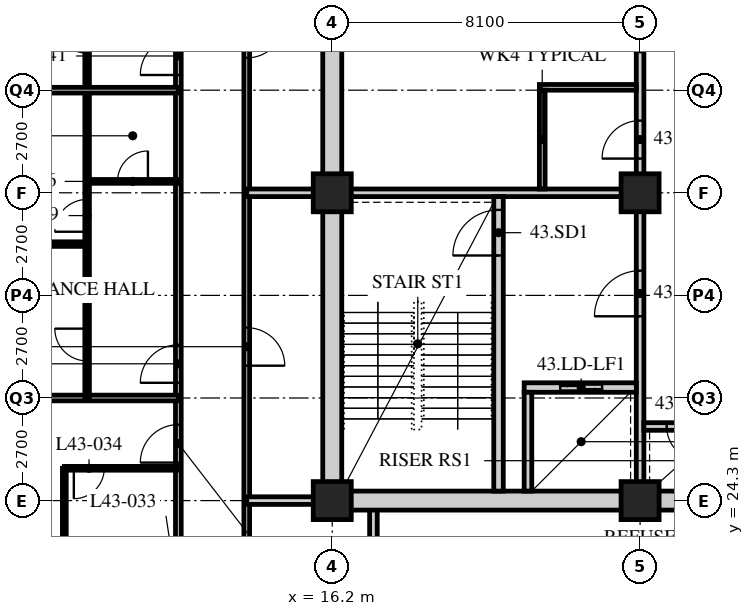
"""IFC4 building model, lengths in metres.
Left out: names, types, materials, properties, quantities, classifications, styles, units other than length and angle.
Written with IfcOpenShell. Run it as: python <this file> out.ifc"""

import sys

from ifc_helpers import new_model, si_unit, direction, frame, frame_2d, origin, origin_2d, place, context, subcontext, project, spatial, rectangle, hollow_rectangle, extrude, element, fill, save


model = new_model("IFC4")
c1 = context("Model", 3, precision=1e-05, world=origin(), true_north=direction((0.0, 1.0)))
c2 = subcontext(c1, "Body", "Model", "MODEL_VIEW")
j1 = project(units=[si_unit("LENGTHUNIT", "METRE"), si_unit("PLANEANGLEUNIT", "RADIAN")], contexts=[c1])
p1 = place(None, origin())
s1 = spatial("IfcSite", under=j1, at=p1, CompositionType="ELEMENT")
p2 = place(p1, origin())
s2 = spatial("IfcBuilding", under=s1, at=p2, CompositionType="ELEMENT")
p3 = place(p2, frame((0.0, 0.0, 170.4)))
s3 = spatial("IfcBuildingStorey", under=s2, at=p3, CompositionType="ELEMENT", Elevation=170.4)
for number, where, z_axis, x_axis in (
    (1, (16.2, 24.3, 0.0), (0.0, 0.0, 1.0), (1.0, 0.0, 0.0)),
    (2, (16.2, 32.4, 0.0), (0.0, 0.0, 1.0), (1.0, 0.0, 0.0)),
    (3, (24.3, 24.3, 0.0), (0.0, 0.0, 1.0), (1.0, 0.0, 0.0)),
    (4, (24.3, 32.4, 0.0), (0.0, 0.0, 1.0), (1.0, 0.0, 0.0)),
):
    element("IfcColumn", number, at=place(p3, frame(where, z_axis=z_axis, x_axis=x_axis)), inside=s3, PredefinedType="COLUMN", context=c2, shape_type="SweptSolid", body=[
        extrude(hollow_rectangle(XDim=1.0, YDim=1.0, WallThickness=0.1, at=origin_2d()), origin(), (0.0, 0.0, 1.0), 3.6),
    ])
p4 = place(p3, frame((12.15, 18.9, 0.0), z_axis=(0.0, 0.0, 1.0), x_axis=(0.0, 1.0, 0.0)))
e5 = element("IfcWall", 5, at=p4, inside=s3, PredefinedType="PARTITIONING", context=c2, shape_type="SweptSolid", body=[
    extrude(rectangle(XDim=24.3, YDim=0.15, at=frame_2d((12.15, 0.0))), origin(), (0.0, 0.0, 1.0), 3.39),
])
p5 = place(p4, frame((2.35, 0.0, 0.0)))
e6 = element("IfcOpeningElement", 6, at=p5, cuts=e5, PredefinedType="OPENING", context=c2, shape_type="SweptSolid", body=[
    extrude(rectangle(XDim=1.0, YDim=2.1, at=frame_2d((0.5, 1.05))), frame((0.0, 0.085, 0.0), z_axis=(0.0, -1.0, 0.0), x_axis=(1.0, 0.0, 0.0)), (0.0, 0.0, 1.0), 0.17),
])
p6 = place(p4, frame((6.4, 0.0, 0.0)))
e7 = element("IfcOpeningElement", 7, at=p6, cuts=e5, PredefinedType="OPENING", context=c2, shape_type="SweptSolid", body=[
    extrude(rectangle(XDim=1.0, YDim=2.1, at=frame_2d((0.5, 1.05))), frame((0.0, 0.085, 0.0), z_axis=(0.0, -1.0, 0.0), x_axis=(1.0, 0.0, 0.0)), (0.0, 0.0, 1.0), 0.17),
])
p7 = place(p4, frame((8.5, 0.0, 0.0)))
e8 = element("IfcOpeningElement", 8, at=p7, cuts=e5, PredefinedType="OPENING", context=c2, shape_type="SweptSolid", body=[
    extrude(rectangle(XDim=1.0, YDim=2.1, at=frame_2d((0.5, 1.05))), frame((0.0, 0.085, 0.0), z_axis=(0.0, -1.0, 0.0), x_axis=(1.0, 0.0, 0.0)), (0.0, 0.0, 1.0), 0.17),
])
p8 = place(p4, frame((16.6, 0.0, 0.0)))
e9 = element("IfcOpeningElement", 9, at=p8, cuts=e5, PredefinedType="OPENING", context=c2, shape_type="SweptSolid", body=[
    extrude(rectangle(XDim=1.0, YDim=2.1, at=frame_2d((0.5, 1.05))), frame((0.0, 0.085, 0.0), z_axis=(0.0, -1.0, 0.0), x_axis=(1.0, 0.0, 0.0)), (0.0, 0.0, 1.0), 0.17),
])
p9 = place(p3, frame((13.95, 40.5, 0.0), z_axis=(0.0, 0.0, 1.0), x_axis=(0.0, -1.0, 0.0)))
e10 = element("IfcWall", 10, at=p9, inside=s3, PredefinedType="PARTITIONING", context=c2, shape_type="SweptSolid", body=[
    extrude(rectangle(XDim=19.8, YDim=0.15, at=frame_2d((9.9, 0.0))), origin(), (0.0, 0.0, 1.0), 3.39),
])
p10 = place(p9, frame((11.65, 0.0, 0.0)))
e11 = element("IfcOpeningElement", 11, at=p10, cuts=e10, PredefinedType="OPENING", context=c2, shape_type="SweptSolid", body=[
    extrude(rectangle(XDim=1.0, YDim=2.1, at=frame_2d((0.5, 1.05))), frame((0.0, 0.085, 0.0), z_axis=(0.0, -1.0, 0.0), x_axis=(1.0, 0.0, 0.0)), (0.0, 0.0, 1.0), 0.17),
])
p11 = place(p9, frame((3.55, 0.0, 0.0)))
e12 = element("IfcOpeningElement", 12, at=p11, cuts=e10, PredefinedType="OPENING", context=c2, shape_type="SweptSolid", body=[
    extrude(rectangle(XDim=1.0, YDim=2.1, at=frame_2d((0.5, 1.05))), frame((0.0, 0.085, 0.0), z_axis=(0.0, -1.0, 0.0), x_axis=(1.0, 0.0, 0.0)), (0.0, 0.0, 1.0), 0.17),
])
p12 = place(p3, frame((13.95, 32.4, 0.0), z_axis=(0.0, 0.0, 1.0), x_axis=(1.0, 0.0, 0.0)))
e13 = element("IfcWall", 13, at=p12, inside=s3, PredefinedType="SOLIDWALL", context=c2, shape_type="SweptSolid", body=[
    extrude(rectangle(XDim=2.25, YDim=0.2, at=frame_2d((1.125, 0.0))), origin(), (0.0, 0.0, 1.0), 3.39),
])
p13 = place(p3, frame((17.283, 20.7, 0.0), z_axis=(0.0, 0.0, 1.0), x_axis=(0.0, 1.0, 0.0)))
e14 = element("IfcWall", 14, at=p13, inside=s3, PredefinedType="SOLIDWALL", context=c2, shape_type="SweptSolid", body=[
    extrude(rectangle(XDim=3.6, YDim=0.2, at=frame_2d((1.8, 0.0))), origin(), (0.0, 0.0, 1.0), 3.39),
])
p14 = place(p3, frame((13.95, 24.3, 0.0), z_axis=(0.0, 0.0, 1.0), x_axis=(1.0, 0.0, 0.0)))
e15 = element("IfcWall", 15, at=p14, inside=s3, PredefinedType="SOLIDWALL", context=c2, shape_type="SweptSolid", body=[
    extrude(rectangle(XDim=2.25, YDim=0.2, at=frame_2d((1.125, 0.0))), origin(), (0.0, 0.0, 1.0), 3.39),
])
p15 = place(p3, frame((9.15, 22.95, 0.0), z_axis=(0.0, 0.0, 1.0), x_axis=(0.0, 1.0, 0.0)))
e16 = element("IfcWall", 16, at=p15, inside=s3, PredefinedType="PARTITIONING", context=c2, shape_type="SweptSolid", body=[
    extrude(rectangle(XDim=2.2, YDim=0.1, at=frame_2d((1.1, 0.0))), origin(), (0.0, 0.0, 1.0), 3.39),
])
p16 = place(p3, frame((12.15, 25.15, 0.0), z_axis=(0.0, 0.0, 1.0), x_axis=(-1.0, 0.0, 0.0)))
e17 = element("IfcWall", 17, at=p16, inside=s3, PredefinedType="PARTITIONING", context=c2, shape_type="SweptSolid", body=[
    extrude(rectangle(XDim=3.0, YDim=0.1, at=frame_2d((1.5, 0.0))), origin(), (0.0, 0.0, 1.0), 3.39),
])
p17 = place(p16, frame((1.95, 0.0, 0.0)))
e18 = element("IfcOpeningElement", 18, at=p17, cuts=e17, PredefinedType="OPENING", context=c2, shape_type="SweptSolid", body=[
    extrude(rectangle(XDim=0.8, YDim=2.1, at=frame_2d((0.4, 1.05))), frame((0.0, 0.06, 0.0), z_axis=(0.0, -1.0, 0.0), x_axis=(1.0, 0.0, 0.0)), (0.0, 0.0, 1.0), 0.12),
])
p18 = place(p3, frame((12.15, 27.0, 0.0), z_axis=(0.0, 0.0, 1.0), x_axis=(-1.0, 0.0, 0.0)))
e19 = element("IfcWall", 19, at=p18, inside=s3, PredefinedType="PARTITIONING", context=c2, shape_type="SweptSolid", body=[
    extrude(rectangle(XDim=11.85, YDim=0.15, at=frame_2d((5.925, 0.0))), origin(), (0.0, 0.0, 1.0), 2.778),
])
p19 = place(p3, frame((9.75, 27.0, 0.0), z_axis=(0.0, 0.0, 1.0), x_axis=(0.0, 1.0, 0.0)))
e20 = element("IfcWall", 20, at=p19, inside=s3, PredefinedType="PARTITIONING", context=c2, shape_type="SweptSolid", body=[
    extrude(rectangle(XDim=16.2, YDim=0.12, at=frame_2d((8.1, 0.0))), origin(), (0.0, 0.0, 1.0), 3.39),
])
p20 = place(p19, frame((0.975, 0.0, 0.0)))
e21 = element("IfcOpeningElement", 21, at=p20, cuts=e20, PredefinedType="OPENING", context=c2, shape_type="SweptSolid", body=[
    extrude(rectangle(XDim=0.85, YDim=2.1, at=frame_2d((0.425, 1.05))), frame((0.0, 0.07, 0.0), z_axis=(0.0, -1.0, 0.0), x_axis=(1.0, 0.0, 0.0)), (0.0, 0.0, 1.0), 0.14),
])
p21 = place(p19, frame((4.375, 0.0, 0.0)))
e22 = element("IfcOpeningElement", 22, at=p21, cuts=e20, PredefinedType="OPENING", context=c2, shape_type="SweptSolid", body=[
    extrude(rectangle(XDim=0.85, YDim=2.1, at=frame_2d((0.425, 1.05))), frame((0.0, 0.07, 0.0), z_axis=(0.0, -1.0, 0.0), x_axis=(1.0, 0.0, 0.0)), (0.0, 0.0, 1.0), 0.14),
])
p22 = place(p19, frame((9.075, 0.0, 0.0)))
e23 = element("IfcOpeningElement", 23, at=p22, cuts=e20, PredefinedType="OPENING", context=c2, shape_type="SweptSolid", body=[
    extrude(rectangle(XDim=0.85, YDim=2.1, at=frame_2d((0.425, 1.05))), frame((0.0, 0.07, 0.0), z_axis=(0.0, -1.0, 0.0), x_axis=(1.0, 0.0, 0.0)), (0.0, 0.0, 1.0), 0.14),
])
p23 = place(p19, frame((12.475, 0.0, 0.0)))
e24 = element("IfcOpeningElement", 24, at=p23, cuts=e20, PredefinedType="OPENING", context=c2, shape_type="SweptSolid", body=[
    extrude(rectangle(XDim=0.85, YDim=2.1, at=frame_2d((0.425, 1.05))), frame((0.0, 0.07, 0.0), z_axis=(0.0, -1.0, 0.0), x_axis=(1.0, 0.0, 0.0)), (0.0, 0.0, 1.0), 0.14),
])
p24 = place(p3, frame((12.15, 32.7, 0.0), z_axis=(0.0, 0.0, 1.0), x_axis=(-1.0, 0.0, 0.0)))
e25 = element("IfcWall", 25, at=p24, inside=s3, PredefinedType="PARTITIONING", context=c2, shape_type="SweptSolid", body=[
    extrude(rectangle(XDim=2.4, YDim=0.1, at=frame_2d((1.2, 0.0))), origin(), (0.0, 0.0, 1.0), 3.39),
])
p25 = place(p24, frame((0.8, 0.0, 0.0)))
e26 = element("IfcOpeningElement", 26, at=p25, cuts=e25, PredefinedType="OPENING", context=c2, shape_type="SweptSolid", body=[
    extrude(rectangle(XDim=0.8, YDim=2.1, at=frame_2d((0.4, 1.05))), frame((0.0, 0.06, 0.0), z_axis=(0.0, -1.0, 0.0), x_axis=(1.0, 0.0, 0.0)), (0.0, 0.0, 1.0), 0.12),
])
p26 = place(p3, frame((9.75, 31.05, 0.0), z_axis=(0.0, 0.0, 1.0), x_axis=(-1.0, 0.0, 0.0)))
e27 = element("IfcWall", 27, at=p26, inside=s3, PredefinedType="PARTITIONING", context=c2, shape_type="SweptSolid", body=[
    extrude(rectangle(XDim=9.45, YDim=0.12, at=frame_2d((4.725, 0.0))), origin(), (0.0, 0.0, 1.0), 3.39),
])
p27 = place(p3, frame((12.15, 35.1, 0.0), z_axis=(0.0, 0.0, 1.0), x_axis=(-1.0, 0.0, 0.0)))
e28 = element("IfcWall", 28, at=p27, inside=s3, PredefinedType="PARTITIONING", context=c2, shape_type="SweptSolid", body=[
    extrude(rectangle(XDim=11.85, YDim=0.15, at=frame_2d((5.925, 0.0))), origin(), (0.0, 0.0, 1.0), 2.778),
])
p28 = place(p3, frame((15.95, 24.3, 0.0), z_axis=(0.0, 0.0, 1.0), x_axis=(1.0, 0.0, 0.0)))
e29 = element("IfcWall", 29, at=p28, inside=s3, PredefinedType="SOLIDWALL", context=c2, shape_type="SweptSolid", body=[
    extrude(rectangle(XDim=24.8, YDim=0.5, at=frame_2d((12.4, 0.0))), origin(), (0.0, 0.0, 1.0), 2.74),
])
p29 = place(p28, frame((11.5, 0.0, 0.0)))
e30 = element("IfcOpeningElement", 30, at=p29, cuts=e29, PredefinedType="OPENING", context=c2, shape_type="SweptSolid", body=[
    extrude(rectangle(XDim=1.8, YDim=2.4, at=frame_2d((0.9, 1.2))), frame((0.0, 0.26, 0.0), z_axis=(0.0, -1.0, 0.0), x_axis=(1.0, 0.0, 0.0)), (0.0, 0.0, 1.0), 0.52),
])
p30 = place(p3, frame((16.2, 24.55, 0.0), z_axis=(0.0, 0.0, 1.0), x_axis=(0.0, 1.0, 0.0)))
e31 = element("IfcWall", 31, at=p30, inside=s3, PredefinedType="SOLIDWALL", context=c2, shape_type="SweptSolid", body=[
    extrude(rectangle(XDim=15.7, YDim=0.5, at=frame_2d((7.85, 0.0))), origin(), (0.0, 0.0, 1.0), 2.778),
])
p31 = place(p3, frame((16.45, 32.4, 0.0), z_axis=(0.0, 0.0, 1.0), x_axis=(1.0, 0.0, 0.0)))
e32 = element("IfcWall", 32, at=p31, inside=s3, PredefinedType="SOLIDWALL", context=c2, shape_type="SweptSolid", body=[
    extrude(rectangle(XDim=7.95, YDim=0.2, at=frame_2d((3.975, 0.0))), origin(), (0.0, 0.0, 1.0), 2.778),
])
p32 = place(p3, frame((24.3, 24.55, 0.0), z_axis=(0.0, 0.0, 1.0), x_axis=(0.0, 1.0, 0.0)))
e33 = element("IfcWall", 33, at=p32, inside=s3, PredefinedType="SOLIDWALL", context=c2, shape_type="SweptSolid", body=[
    extrude(rectangle(XDim=7.75, YDim=0.2, at=frame_2d((3.875, 0.0))), origin(), (0.0, 0.0, 1.0), 2.778),
])
p33 = place(p32, frame((4.6, 0.0, 0.0)))
e34 = element("IfcOpeningElement", 34, at=p33, cuts=e33, PredefinedType="OPENING", context=c2, shape_type="SweptSolid", body=[
    extrude(rectangle(XDim=1.2, YDim=2.1, at=frame_2d((0.6, 1.05))), frame((0.0, 0.11, 0.0), z_axis=(0.0, -1.0, 0.0), x_axis=(1.0, 0.0, 0.0)), (0.0, 0.0, 1.0), 0.22),
])
p34 = place(p3, frame((20.575, 24.55, 0.0), z_axis=(0.0, 0.0, 1.0), x_axis=(0.0, 1.0, 0.0)))
e35 = element("IfcWall", 35, at=p34, inside=s3, PredefinedType="SOLIDWALL", context=c2, shape_type="SweptSolid", body=[
    extrude(rectangle(XDim=7.75, YDim=0.25, at=frame_2d((3.875, 0.0))), origin(), (0.0, 0.0, 1.0), 3.39),
])
p35 = place(p34, frame((6.2, 0.0, 0.0)))
e36 = element("IfcOpeningElement", 36, at=p35, cuts=e35, PredefinedType="OPENING", context=c2, shape_type="SweptSolid", body=[
    extrude(rectangle(XDim=1.2, YDim=2.1, at=frame_2d((0.6, 1.05))), frame((0.0, 0.135, 0.0), z_axis=(0.0, -1.0, 0.0), x_axis=(1.0, 0.0, 0.0)), (0.0, 0.0, 1.0), 0.27),
])
p36 = place(p3, frame((21.25, 27.275, 0.0), z_axis=(0.0, 0.0, 1.0), x_axis=(1.0, 0.0, 0.0)))
e37 = element("IfcWall", 37, at=p36, inside=s3, PredefinedType="SOLIDWALL", context=c2, shape_type="SweptSolid", body=[
    extrude(rectangle(XDim=2.95, YDim=0.25, at=frame_2d((1.475, 0.0))), origin(), (0.0, 0.0, 1.0), 3.39),
])
p37 = place(p36, frame((0.95, 0.0, 0.0)))
e38 = element("IfcOpeningElement", 38, at=p37, cuts=e37, PredefinedType="OPENING", context=c2, shape_type="SweptSolid", body=[
    extrude(rectangle(XDim=1.1, YDim=2.4, at=frame_2d((0.55, 1.2))), frame((0.0, 0.135, 0.0), z_axis=(0.0, -1.0, 0.0), x_axis=(1.0, 0.0, 0.0)), (0.0, 0.0, 1.0), 0.27),
])
p38 = place(p3, frame((21.35, 24.55, 0.0), z_axis=(0.0, 0.0, 1.0), x_axis=(0.0, 1.0, 0.0)))
e39 = element("IfcWall", 39, at=p38, inside=s3, PredefinedType="SOLIDWALL", context=c2, shape_type="SweptSolid", body=[
    extrude(rectangle(XDim=2.6, YDim=0.2, at=frame_2d((1.3, 0.0))), origin(), (0.0, 0.0, 1.0), 3.39),
])
p39 = place(p3, frame((24.4, 26.25, 0.0), z_axis=(0.0, 0.0, 1.0), x_axis=(1.0, 0.0, 0.0)))
e40 = element("IfcWall", 40, at=p39, inside=s3, PredefinedType="SOLIDWALL", context=c2, shape_type="SweptSolid", body=[
    extrude(rectangle(XDim=2.15, YDim=0.2, at=frame_2d((1.075, 0.0))), origin(), (0.0, 0.0, 1.0), 3.39),
])
p40 = place(p39, frame((0.6, 0.0, 0.0)))
e41 = element("IfcOpeningElement", 41, at=p40, cuts=e40, PredefinedType="OPENING", context=c2, shape_type="SweptSolid", body=[
    extrude(rectangle(XDim=0.9, YDim=2.1, at=frame_2d((0.45, 1.05))), frame((0.0, 0.11, 0.0), z_axis=(0.0, -1.0, 0.0), x_axis=(1.0, 0.0, 0.0)), (0.0, 0.0, 1.0), 0.22),
])
p41 = place(p3, frame((24.3, 32.5, 0.0), z_axis=(0.0, 0.0, 1.0), x_axis=(0.0, 1.0, 0.0)))
e42 = element("IfcWall", 42, at=p41, inside=s3, PredefinedType="PARTITIONING", context=c2, shape_type="SweptSolid", body=[
    extrude(rectangle(XDim=7.75, YDim=0.2, at=frame_2d((3.875, 0.0))), origin(), (0.0, 0.0, 1.0), 2.778),
])
p42 = place(p41, frame((0.8, 0.0, 0.0)))
e43 = element("IfcOpeningElement", 43, at=p42, cuts=e42, PredefinedType="OPENING", context=c2, shape_type="SweptSolid", body=[
    extrude(rectangle(XDim=1.0, YDim=2.1, at=frame_2d((0.5, 1.05))), frame((0.0, 0.11, 0.0), z_axis=(0.0, -1.0, 0.0), x_axis=(1.0, 0.0, 0.0)), (0.0, 0.0, 1.0), 0.22),
])
p43 = place(p41, frame((3.6, 0.0, 0.0)))
e44 = element("IfcOpeningElement", 44, at=p43, cuts=e42, PredefinedType="OPENING", context=c2, shape_type="SweptSolid", body=[
    extrude(rectangle(XDim=0.9, YDim=2.1, at=frame_2d((0.45, 1.05))), frame((0.0, 0.11, 0.0), z_axis=(0.0, -1.0, 0.0), x_axis=(1.0, 0.0, 0.0)), (0.0, 0.0, 1.0), 0.22),
])
p44 = place(p41, frame((6.175, 0.0, 0.0)))
e45 = element("IfcOpeningElement", 45, at=p44, cuts=e42, PredefinedType="OPENING", context=c2, shape_type="SweptSolid", body=[
    extrude(rectangle(XDim=0.9, YDim=2.1, at=frame_2d((0.45, 1.05))), frame((0.0, 0.11, 0.0), z_axis=(0.0, -1.0, 0.0), x_axis=(1.0, 0.0, 0.0)), (0.0, 0.0, 1.0), 0.22),
])
p45 = place(p3, frame((21.65, 35.175, 0.0), z_axis=(0.0, 0.0, 1.0), x_axis=(1.0, 0.0, 0.0)))
e46 = element("IfcWall", 46, at=p45, inside=s3, PredefinedType="PARTITIONING", context=c2, shape_type="SweptSolid", body=[
    extrude(rectangle(XDim=2.55, YDim=0.15, at=frame_2d((1.275, 0.0))), origin(), (0.0, 0.0, 1.0), 3.39),
])
p46 = place(p3, frame((21.725, 32.5, 0.0), z_axis=(0.0, 0.0, 1.0), x_axis=(0.0, 1.0, 0.0)))
e47 = element("IfcWall", 47, at=p46, inside=s3, PredefinedType="PARTITIONING", context=c2, shape_type="SweptSolid", body=[
    extrude(rectangle(XDim=2.6, YDim=0.15, at=frame_2d((1.3, 0.0))), origin(), (0.0, 0.0, 1.0), 3.39),
])
p47 = place(p10, origin())
e48 = element("IfcDoor", 48, at=p47, inside=s3, OperationType="SINGLE_SWING_RIGHT", PredefinedType="DOOR", context=c2, shape_type="SweptSolid", body=[
    extrude(rectangle(XDim=1.0, YDim=2.1, at=frame_2d((0.5, 1.05))), frame((0.0, 0.025, 0.0), z_axis=(0.0, -1.0, 0.0), x_axis=(1.0, 0.0, 0.0)), (0.0, 0.0, 1.0), 0.05),
])
fill(e11, e48)
p48 = place(p11, origin())
e49 = element("IfcDoor", 49, at=p48, inside=s3, OperationType="SINGLE_SWING_LEFT", PredefinedType="DOOR", context=c2, shape_type="SweptSolid", body=[
    extrude(rectangle(XDim=1.0, YDim=2.1, at=frame_2d((0.5, 1.05))), frame((0.0, 0.025, 0.0), z_axis=(0.0, -1.0, 0.0), x_axis=(1.0, 0.0, 0.0)), (0.0, 0.0, 1.0), 0.05),
])
fill(e12, e49)
p49 = place(p17, origin())
e50 = element("IfcDoor", 50, at=p49, inside=s3, OperationType="SINGLE_SWING_RIGHT", PredefinedType="DOOR", context=c2, shape_type="SweptSolid", body=[
    extrude(rectangle(XDim=0.8, YDim=2.1, at=frame_2d((0.4, 1.05))), frame((0.0, 0.025, 0.0), z_axis=(0.0, -1.0, 0.0), x_axis=(1.0, 0.0, 0.0)), (0.0, 0.0, 1.0), 0.05),
])
fill(e18, e50)
p50 = place(p6, origin())
e51 = element("IfcDoor", 51, at=p50, inside=s3, OperationType="SINGLE_SWING_LEFT", PredefinedType="DOOR", context=c2, shape_type="SweptSolid", body=[
    extrude(rectangle(XDim=1.0, YDim=2.1, at=frame_2d((0.5, 1.05))), frame((0.0, 0.025, 0.0), z_axis=(0.0, -1.0, 0.0), x_axis=(1.0, 0.0, 0.0)), (0.0, 0.0, 1.0), 0.05),
])
fill(e7, e51)
p51 = place(p25, origin())
e52 = element("IfcDoor", 52, at=p51, inside=s3, OperationType="SINGLE_SWING_RIGHT", PredefinedType="DOOR", context=c2, shape_type="SweptSolid", body=[
    extrude(rectangle(XDim=0.8, YDim=2.1, at=frame_2d((0.4, 1.05))), frame((0.0, 0.025, 0.0), z_axis=(0.0, -1.0, 0.0), x_axis=(1.0, 0.0, 0.0)), (0.0, 0.0, 1.0), 0.05),
])
fill(e26, e52)
p52 = place(p7, origin())
e53 = element("IfcDoor", 53, at=p52, inside=s3, OperationType="SINGLE_SWING_LEFT", PredefinedType="DOOR", context=c2, shape_type="SweptSolid", body=[
    extrude(rectangle(XDim=1.0, YDim=2.1, at=frame_2d((0.5, 1.05))), frame((0.0, 0.025, 0.0), z_axis=(0.0, -1.0, 0.0), x_axis=(1.0, 0.0, 0.0)), (0.0, 0.0, 1.0), 0.05),
])
fill(e8, e53)
p53 = place(p20, origin())
e54 = element("IfcDoor", 54, at=p53, inside=s3, OperationType="SINGLE_SWING_RIGHT", PredefinedType="DOOR", context=c2, shape_type="SweptSolid", body=[
    extrude(rectangle(XDim=0.85, YDim=2.1, at=frame_2d((0.425, 1.05))), frame((0.0, 0.025, 0.0), z_axis=(0.0, -1.0, 0.0), x_axis=(1.0, 0.0, 0.0)), (0.0, 0.0, 1.0), 0.05),
])
fill(e21, e54)
p54 = place(p21, origin())
e55 = element("IfcDoor", 55, at=p54, inside=s3, OperationType="SINGLE_SWING_LEFT", PredefinedType="DOOR", context=c2, shape_type="SweptSolid", body=[
    extrude(rectangle(XDim=0.85, YDim=2.1, at=frame_2d((0.425, 1.05))), frame((0.0, 0.025, 0.0), z_axis=(0.0, -1.0, 0.0), x_axis=(1.0, 0.0, 0.0)), (0.0, 0.0, 1.0), 0.05),
])
fill(e22, e55)
p55 = place(p8, origin())
e56 = element("IfcDoor", 56, at=p55, inside=s3, OperationType="SINGLE_SWING_LEFT", PredefinedType="DOOR", context=c2, shape_type="SweptSolid", body=[
    extrude(rectangle(XDim=1.0, YDim=2.1, at=frame_2d((0.5, 1.05))), frame((0.0, 0.025, 0.0), z_axis=(0.0, -1.0, 0.0), x_axis=(1.0, 0.0, 0.0)), (0.0, 0.0, 1.0), 0.05),
])
fill(e9, e56)
p56 = place(p22, origin())
e57 = element("IfcDoor", 57, at=p56, inside=s3, OperationType="SINGLE_SWING_RIGHT", PredefinedType="DOOR", context=c2, shape_type="SweptSolid", body=[
    extrude(rectangle(XDim=0.85, YDim=2.1, at=frame_2d((0.425, 1.05))), frame((0.0, 0.025, 0.0), z_axis=(0.0, -1.0, 0.0), x_axis=(1.0, 0.0, 0.0)), (0.0, 0.0, 1.0), 0.05),
])
fill(e23, e57)
p57 = place(p42, origin())
e58 = element("IfcDoor", 58, at=p57, inside=s3, OperationType="SINGLE_SWING_LEFT", PredefinedType="DOOR", context=c2, shape_type="SweptSolid", body=[
    extrude(rectangle(XDim=1.0, YDim=2.1, at=frame_2d((0.5, 1.05))), frame((0.0, 0.025, 0.0), z_axis=(0.0, -1.0, 0.0), x_axis=(1.0, 0.0, 0.0)), (0.0, 0.0, 1.0), 0.05),
])
fill(e43, e58)
p58 = place(p35, origin())
e59 = element("IfcDoor", 59, at=p58, inside=s3, OperationType="SINGLE_SWING_LEFT", PredefinedType="DOOR", context=c2, shape_type="SweptSolid", body=[
    extrude(rectangle(XDim=1.2, YDim=2.1, at=frame_2d((0.6, 1.05))), frame((0.0, 0.025, 0.0), z_axis=(0.0, -1.0, 0.0), x_axis=(1.0, 0.0, 0.0)), (0.0, 0.0, 1.0), 0.05),
])
fill(e36, e59)
p59 = place(p33, origin())
e60 = element("IfcDoor", 60, at=p59, inside=s3, OperationType="SINGLE_SWING_LEFT", PredefinedType="DOOR", context=c2, shape_type="SweptSolid", body=[
    extrude(rectangle(XDim=1.2, YDim=2.1, at=frame_2d((0.6, 1.05))), frame((0.0, 0.025, 0.0), z_axis=(0.0, -1.0, 0.0), x_axis=(1.0, 0.0, 0.0)), (0.0, 0.0, 1.0), 0.05),
])
fill(e34, e60)
p60 = place(p40, origin())
e61 = element("IfcDoor", 61, at=p60, inside=s3, OperationType="SINGLE_SWING_LEFT", PredefinedType="DOOR", context=c2, shape_type="SweptSolid", body=[
    extrude(rectangle(XDim=0.9, YDim=2.1, at=frame_2d((0.45, 1.05))), frame((0.0, 0.025, 0.0), z_axis=(0.0, -1.0, 0.0), x_axis=(1.0, 0.0, 0.0)), (0.0, 0.0, 1.0), 0.05),
])
fill(e41, e61)
p61 = place(p37, origin())
e62 = element("IfcDoor", 62, at=p61, inside=s3, OperationType="DOUBLE_DOOR_SLIDING", PredefinedType="DOOR", context=c2, shape_type="SweptSolid", body=[
    extrude(rectangle(XDim=1.1, YDim=2.4, at=frame_2d((0.55, 1.2))), frame((0.0, 0.025, 0.0), z_axis=(0.0, -1.0, 0.0), x_axis=(1.0, 0.0, 0.0)), (0.0, 0.0, 1.0), 0.05),
])
fill(e38, e62)
save(model, sys.argv[1])
